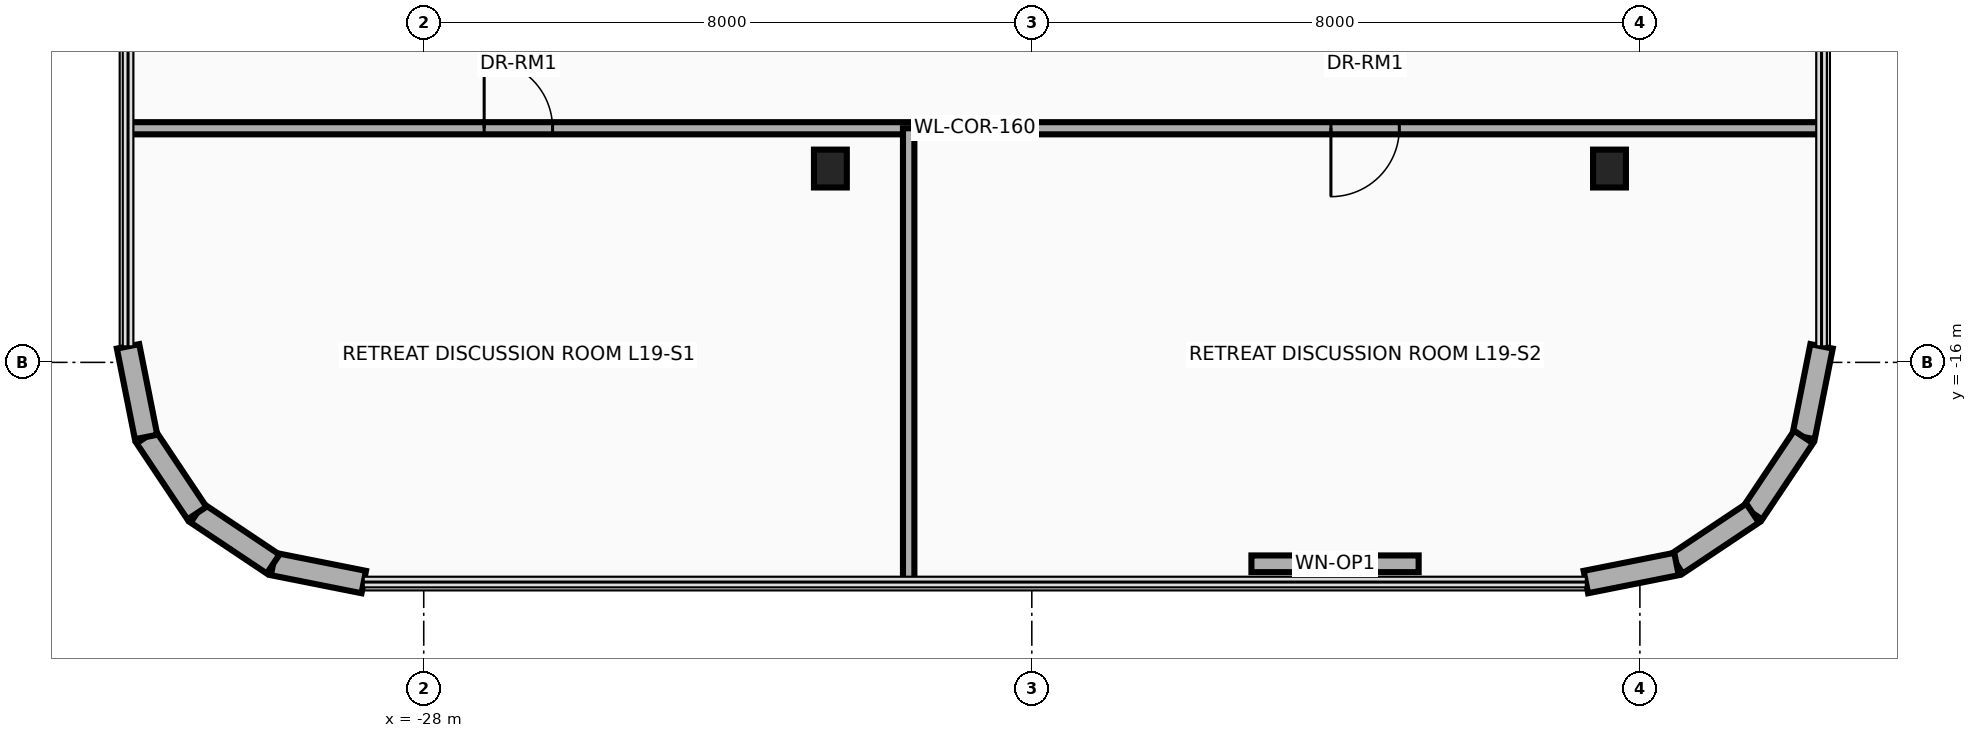
"""IFC4 building model, lengths in metres.
Left out: names, types, materials, properties, quantities, classifications, styles, units other than length and angle.
Written with IfcOpenShell. Run it as: python <this file> out.ifc"""

import sys

from ifc_helpers import new_model, si_unit, direction, frame, frame_2d, origin, origin_2d, place, context, subcontext, project, spatial, rectangle, i_section, extrude, source, transform, mapped, element, fill, save


model = new_model("IFC4")
c1 = context("Model", 3, precision=1e-05, world=origin(), true_north=direction((0.0, 1.0)))
c2 = subcontext(c1, "Body", "Model", "MODEL_VIEW")
j1 = project(units=[si_unit("LENGTHUNIT", "METRE"), si_unit("PLANEANGLEUNIT", "RADIAN")], contexts=[c1])
p1 = place(None, origin())
s1 = spatial("IfcSite", under=j1, at=p1, CompositionType="ELEMENT")
p2 = place(p1, origin())
s2 = spatial("IfcBuilding", under=s1, at=p2, CompositionType="ELEMENT")
p3 = place(p2, frame((0.0, 0.0, 77.8)))
s3 = spatial("IfcBuildingStorey", under=s2, at=p3, CompositionType="ELEMENT", Elevation=77.8)
m1 = source(origin(), c2, "Body", "SweptSolid", [
    extrude(i_section(OverallWidth=0.432, OverallDepth=0.498, WebThickness=0.056, FlangeThickness=0.089, at=origin_2d()), origin(), (0.0, 0.0, 1.0), 3.7),
])
for number, where, z_axis, x_axis in (
    (1, (-22.65, -13.45, 0.0), (0.0, 0.0, 1.0), (1.0, 0.0, 0.0)),
    (2, (-12.4, -13.45, 0.0), (0.0, 0.0, 1.0), (1.0, 0.0, 0.0)),
):
    element("IfcColumn", number, at=place(p3, frame(where, z_axis=z_axis, x_axis=x_axis)), inside=s3, PredefinedType="COLUMN", context=c2, shape_type="MappedRepresentation", body=[
        mapped(m1, transform((0.0, 0.0, 0.0), x_axis=(1.0, 0.0, 0.0), y_axis=(0.0, 1.0, 0.0), z_axis=(0.0, 0.0, 1.0), scale=1.0)),
    ])
p4 = place(p3, frame((-9.61, -15.789, 0.0), z_axis=(0.0, 0.0, 1.0), x_axis=(-0.194996050505, -0.980804027463, 0.0)))
e3 = element("IfcWall", 3, at=p4, inside=s3, PredefinedType="SOLIDWALL", context=c2, shape_type="SweptSolid", body=[
    extrude(rectangle(XDim=1.216, YDim=0.3, at=frame_2d((0.608, 0.0))), origin(), (0.0, 0.0, 1.0), 3.46),
])
for number, where, z_axis, x_axis in (
    (4, (-9.847, -16.982, 0.0), (0.0, 0.0, 1.0), (-0.556, -0.831, 0.0)),
    (5, (-10.517, -17.983, 0.0), (0.0, 0.0, 1.0), (-0.831, -0.556, 0.0)),
):
    element("IfcWall", number, at=place(p3, frame(where, z_axis=z_axis, x_axis=x_axis)), inside=s3, PredefinedType="SOLIDWALL", context=c2, shape_type="SweptSolid", body=[
        extrude(rectangle(XDim=1.205, YDim=0.3, at=frame_2d((0.603, 0.0))), origin(), (0.0, 0.0, 1.0), 3.46),
    ])
p5 = place(p3, frame((-11.518, -18.653, 0.0), z_axis=(0.0, 0.0, 1.0), x_axis=(-0.980804027463, -0.194996050505, 0.0)))
e6 = element("IfcWall", 6, at=p5, inside=s3, PredefinedType="SOLIDWALL", context=c2, shape_type="SweptSolid", body=[
    extrude(rectangle(XDim=1.216, YDim=0.3, at=frame_2d((0.608, 0.0))), origin(), (0.0, 0.0, 1.0), 3.46),
])
p6 = place(p3, frame((-14.911, -18.65, 0.0), z_axis=(0.0, 0.0, 1.0), x_axis=(-1.0, 0.0, 0.0)))
e7 = element("IfcWall", 7, at=p6, inside=s3, PredefinedType="SOLIDWALL", context=c2, shape_type="SweptSolid", body=[
    extrude(rectangle(XDim=2.2, YDim=0.22, at=frame_2d((1.1, 0.0))), origin(), (0.0, 0.0, 1.0), 3.46),
])
p7 = place(p6, frame((0.65, 0.0, 0.95)))
e8 = element("IfcOpeningElement", 8, at=p7, cuts=e7, PredefinedType="OPENING", context=c2, shape_type="SweptSolid", body=[
    extrude(rectangle(XDim=0.9, YDim=1.3, at=frame_2d((0.45, 0.65))), frame((0.0, 0.125, 0.0), z_axis=(0.0, -1.0, 0.0), x_axis=(1.0, 0.0, 0.0)), (0.0, 0.0, 1.0), 0.25),
])
p8 = place(p3, frame((-28.789, -18.89, 0.0), z_axis=(0.0, 0.0, 1.0), x_axis=(-0.980804027463, 0.194996050505, 0.0)))
e9 = element("IfcWall", 9, at=p8, inside=s3, PredefinedType="SOLIDWALL", context=c2, shape_type="SweptSolid", body=[
    extrude(rectangle(XDim=1.216, YDim=0.3, at=frame_2d((0.608, 0.0))), origin(), (0.0, 0.0, 1.0), 3.46),
])
for number, where, z_axis, x_axis in (
    (10, (-29.982, -18.653, 0.0), (0.0, 0.0, 1.0), (-0.831, 0.556, 0.0)),
    (11, (-30.983, -17.983, 0.0), (0.0, 0.0, 1.0), (-0.556, 0.831, 0.0)),
):
    element("IfcWall", number, at=place(p3, frame(where, z_axis=z_axis, x_axis=x_axis)), inside=s3, PredefinedType="SOLIDWALL", context=c2, shape_type="SweptSolid", body=[
        extrude(rectangle(XDim=1.205, YDim=0.3, at=frame_2d((0.603, 0.0))), origin(), (0.0, 0.0, 1.0), 3.46),
    ])
p9 = place(p3, frame((-31.653, -16.982, 0.0), z_axis=(0.0, 0.0, 1.0), x_axis=(-0.194996050505, 0.980804027463, 0.0)))
e12 = element("IfcWall", 12, at=p9, inside=s3, PredefinedType="SOLIDWALL", context=c2, shape_type="SweptSolid", body=[
    extrude(rectangle(XDim=1.216, YDim=0.3, at=frame_2d((0.608, 0.0))), origin(), (0.0, 0.0, 1.0), 3.46),
])
p10 = place(p3, frame((-31.89, -12.92, 0.0), z_axis=(0.0, 0.0, 1.0), x_axis=(1.0, 0.0, 0.0)))
e13 = element("IfcWall", 13, at=p10, inside=s3, PredefinedType="PARTITIONING", context=c2, shape_type="SweptSolid", body=[
    extrude(rectangle(XDim=22.28, YDim=0.16, at=frame_2d((11.14, 0.0))), origin(), (0.0, 0.0, 1.0), 2.834),
])
p11 = place(p10, frame((4.685, 0.0, 0.0)))
e14 = element("IfcOpeningElement", 14, at=p11, cuts=e13, PredefinedType="OPENING", context=c2, shape_type="SweptSolid", body=[
    extrude(rectangle(XDim=0.9, YDim=2.1, at=frame_2d((0.45, 1.05))), frame((0.0, 0.095, 0.0), z_axis=(0.0, -1.0, 0.0), x_axis=(1.0, 0.0, 0.0)), (0.0, 0.0, 1.0), 0.19),
])
p12 = place(p10, frame((15.825, 0.0, 0.0)))
e15 = element("IfcOpeningElement", 15, at=p12, cuts=e13, PredefinedType="OPENING", context=c2, shape_type="SweptSolid", body=[
    extrude(rectangle(XDim=0.9, YDim=2.1, at=frame_2d((0.45, 1.05))), frame((0.0, 0.095, 0.0), z_axis=(0.0, -1.0, 0.0), x_axis=(1.0, 0.0, 0.0)), (0.0, 0.0, 1.0), 0.19),
])
p13 = place(p3, frame((-21.62, -18.89, 0.0), z_axis=(0.0, 0.0, 1.0), x_axis=(0.0, 1.0, 0.0)))
e16 = element("IfcWall", 16, at=p13, inside=s3, PredefinedType="PARTITIONING", context=c2, shape_type="SweptSolid", body=[
    extrude(rectangle(XDim=5.97, YDim=0.15, at=frame_2d((2.985, 0.0))), origin(), (0.0, 0.0, 1.0), 2.896),
])
p14 = place(p7, origin())
e17 = element("IfcWindow", 17, at=p14, inside=s3, PartitioningType="SINGLE_PANEL", PredefinedType="WINDOW", context=c2, shape_type="SweptSolid", body=[
    extrude(rectangle(XDim=0.9, YDim=1.3, at=frame_2d((0.45, 0.65))), frame((0.0, 0.03, 0.0), z_axis=(0.0, -1.0, 0.0), x_axis=(1.0, 0.0, 0.0)), (0.0, 0.0, 1.0), 0.06),
])
fill(e8, e17)
p15 = place(p11, origin())
e18 = element("IfcDoor", 18, at=p15, inside=s3, OperationType="SINGLE_SWING_RIGHT", PredefinedType="DOOR", context=c2, shape_type="SweptSolid", body=[
    extrude(rectangle(XDim=0.9, YDim=2.1, at=frame_2d((0.45, 1.05))), frame((0.0, 0.025, 0.0), z_axis=(0.0, -1.0, 0.0), x_axis=(1.0, 0.0, 0.0)), (0.0, 0.0, 1.0), 0.05),
])
fill(e14, e18)
p16 = place(p12, frame((0.9, 0.0, 0.0), z_axis=(0.0, 0.0, 1.0), x_axis=(-1.0, 0.0, 0.0)))
e19 = element("IfcDoor", 19, at=p16, inside=s3, OperationType="SINGLE_SWING_LEFT", PredefinedType="DOOR", context=c2, shape_type="SweptSolid", body=[
    extrude(rectangle(XDim=0.9, YDim=2.1, at=frame_2d((0.45, 1.05))), frame((0.0, 0.025, 0.0), z_axis=(0.0, -1.0, 0.0), x_axis=(1.0, 0.0, 0.0)), (0.0, 0.0, 1.0), 0.05),
])
fill(e15, e19)
save(model, sys.argv[1])
